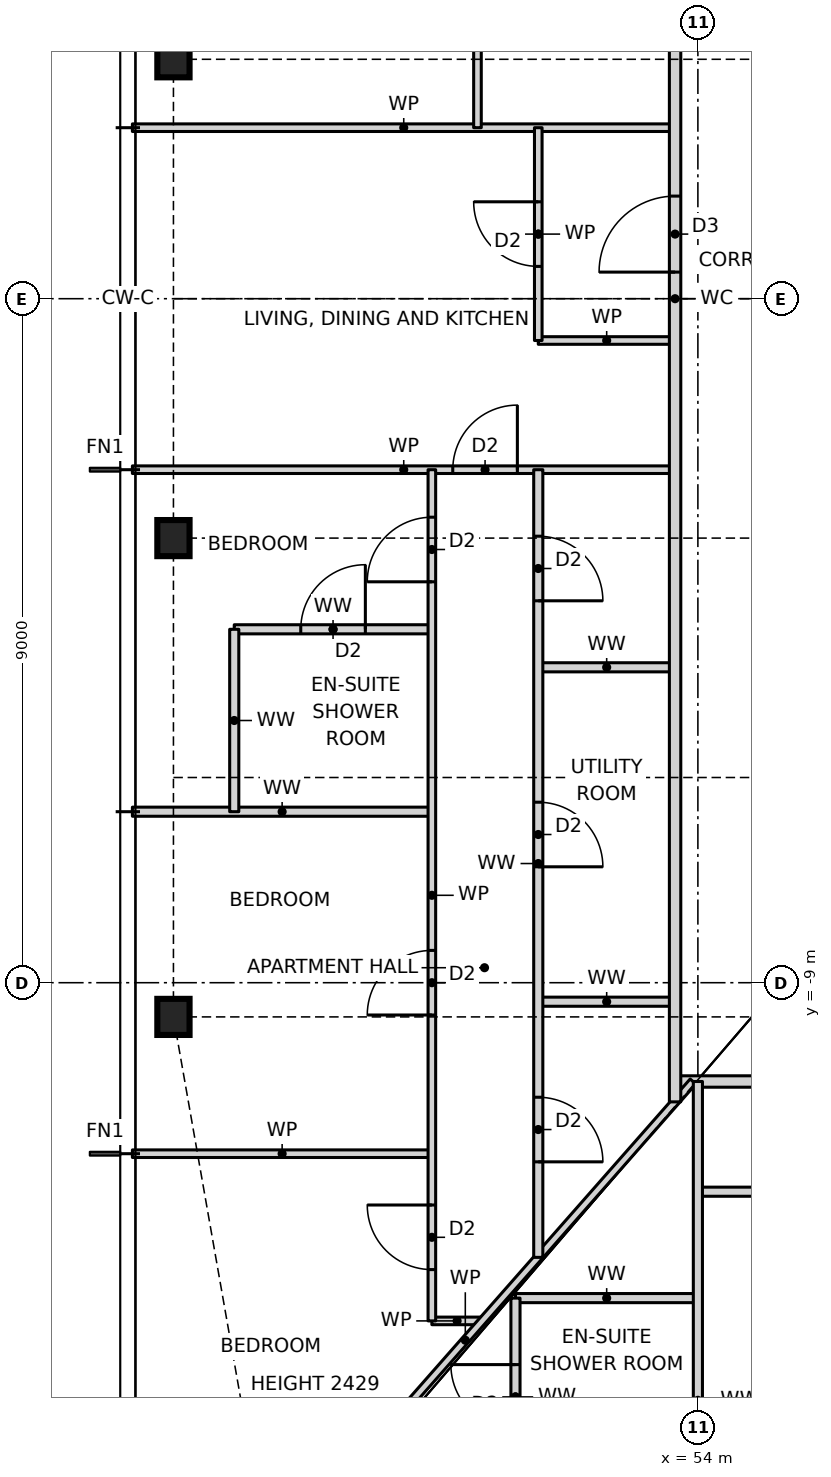
"""IFC4 building model, lengths in metres.
Left out: names, types, materials, properties, quantities, classifications, styles, units other than length and angle.
Written with IfcOpenShell. Run it as: python <this file> out.ifc"""

import sys

from ifc_helpers import new_model, si_unit, direction, frame, frame_2d, origin, origin_2d, place, context, subcontext, project, spatial, rectangle, i_section, extrude, element, fill, save


model = new_model("IFC4")
c1 = context("Model", 3, precision=1e-05, world=origin(), true_north=direction((0.0, 1.0)))
c2 = subcontext(c1, "Body", "Model", "MODEL_VIEW")
j1 = project(units=[si_unit("LENGTHUNIT", "METRE"), si_unit("PLANEANGLEUNIT", "RADIAN")], contexts=[c1])
p1 = place(None, origin())
s1 = spatial("IfcSite", under=j1, at=p1, CompositionType="ELEMENT")
p2 = place(p1, origin())
s2 = spatial("IfcBuilding", under=s1, at=p2, CompositionType="ELEMENT")
p3 = place(p2, frame((0.0, 0.0, 53.5)))
s3 = spatial("IfcBuildingStorey", under=s2, at=p3, CompositionType="ELEMENT", Elevation=53.5)
for number, where, z_axis, x_axis in (
    (1, (47.1, 3.15, 0.0), (0.0, 0.0, 1.0), (1.0, 0.0, 0.0)),
    (2, (47.1, -3.15, 0.0), (0.0, 0.0, 1.0), (1.0, 0.0, 0.0)),
    (3, (47.1, -9.45, 0.0), (0.0, 0.0, 1.0), (1.0, 0.0, 0.0)),
):
    element("IfcColumn", number, at=place(p3, frame(where, z_axis=z_axis, x_axis=x_axis)), inside=s3, PredefinedType="COLUMN", context=c2, shape_type="SweptSolid", body=[
        extrude(i_section(OverallWidth=0.424, OverallDepth=0.475, WebThickness=0.048, FlangeThickness=0.077, at=origin_2d()), origin(), (0.0, 0.0, 1.0), 3.5),
    ])
p4 = place(p3, frame((50.5, -13.45, 0.0), z_axis=(0.0, 0.0, 1.0), x_axis=(1.0, 0.0, 0.0)))
e4 = element("IfcWall", 4, at=p4, inside=s3, PredefinedType="PARTITIONING", context=c2, shape_type="SweptSolid", body=[
    extrude(rectangle(XDim=0.664, YDim=0.1, at=frame_2d((0.332, 0.0))), origin(), (0.0, 0.0, 1.0), 3.27),
])
p5 = place(p3, frame((51.6, -13.15, 0.0), z_axis=(0.0, 0.0, 1.0), x_axis=(1.0, 0.0, 0.0)))
e5 = element("IfcWall", 5, at=p5, inside=s3, PredefinedType="PARTITIONING", context=c2, shape_type="SweptSolid", body=[
    extrude(rectangle(XDim=2.4, YDim=0.12, at=frame_2d((1.2, 0.0))), origin(), (0.0, 0.0, 1.0), 3.27),
])
p6 = place(p3, frame((54.0, -11.75, 0.0), z_axis=(0.0, 0.0, 1.0), x_axis=(1.0, 0.0, 0.0)))
e6 = element("IfcWall", 6, at=p6, inside=s3, PredefinedType="PARTITIONING", context=c2, shape_type="SweptSolid", body=[
    extrude(rectangle(XDim=19.34, YDim=0.12, at=frame_2d((9.67, 0.0))), origin(), (0.0, 0.0, 1.0), 3.27),
])
p7 = place(p6, frame((1.375, 0.0, 0.0)))
e7 = element("IfcOpeningElement", 7, at=p7, cuts=e6, PredefinedType="OPENING", context=c2, shape_type="SweptSolid", body=[
    extrude(rectangle(XDim=0.85, YDim=2.1, at=frame_2d((0.425, 1.05))), frame((0.0, 0.07, 0.0), z_axis=(0.0, -1.0, 0.0), x_axis=(1.0, 0.0, 0.0)), (0.0, 0.0, 1.0), 0.14),
])
p8 = place(p6, frame((4.575, 0.0, 0.0)))
e8 = element("IfcOpeningElement", 8, at=p8, cuts=e6, PredefinedType="OPENING", context=c2, shape_type="SweptSolid", body=[
    extrude(rectangle(XDim=0.85, YDim=2.1, at=frame_2d((0.425, 1.05))), frame((0.0, 0.07, 0.0), z_axis=(0.0, -1.0, 0.0), x_axis=(1.0, 0.0, 0.0)), (0.0, 0.0, 1.0), 0.14),
])
p9 = place(p6, frame((11.325, 0.0, 0.0)))
e9 = element("IfcOpeningElement", 9, at=p9, cuts=e6, PredefinedType="OPENING", context=c2, shape_type="SweptSolid", body=[
    extrude(rectangle(XDim=0.85, YDim=2.1, at=frame_2d((0.425, 1.05))), frame((0.0, 0.07, 0.0), z_axis=(0.0, -1.0, 0.0), x_axis=(1.0, 0.0, 0.0)), (0.0, 0.0, 1.0), 0.14),
])
p10 = place(p6, frame((16.495, 0.0, 0.0)))
e10 = element("IfcOpeningElement", 10, at=p10, cuts=e6, PredefinedType="OPENING", context=c2, shape_type="SweptSolid", body=[
    extrude(rectangle(XDim=0.85, YDim=2.1, at=frame_2d((0.425, 1.05))), frame((0.0, 0.07, 0.0), z_axis=(0.0, -1.0, 0.0), x_axis=(1.0, 0.0, 0.0)), (0.0, 0.0, 1.0), 0.14),
])
p11 = place(p3, frame((46.56, -11.25, 0.0), z_axis=(0.0, 0.0, 1.0), x_axis=(1.0, 0.0, 0.0)))
e11 = element("IfcWall", 11, at=p11, inside=s3, PredefinedType="PARTITIONING", context=c2, shape_type="SweptSolid", body=[
    extrude(rectangle(XDim=3.94, YDim=0.1, at=frame_2d((1.97, 0.0))), origin(), (0.0, 0.0, 1.0), 3.27),
])
p12 = place(p3, frame((53.7, -10.3, 0.0), z_axis=(0.0, 0.0, 1.0), x_axis=(1.0, 0.0, 0.0)))
e12 = element("IfcWall", 12, at=p12, inside=s3, PredefinedType="PARTITIONING", context=c2, shape_type="SweptSolid", body=[
    extrude(rectangle(XDim=18.6, YDim=0.15, at=frame_2d((9.3, 0.0))), origin(), (0.0, 0.0, 1.0), 3.27),
])
p13 = place(p12, frame((4.8, 0.0, 0.0)))
e13 = element("IfcOpeningElement", 13, at=p13, cuts=e12, PredefinedType="OPENING", context=c2, shape_type="SweptSolid", body=[
    extrude(rectangle(XDim=1.0, YDim=2.1, at=frame_2d((0.5, 1.05))), frame((0.0, 0.085, 0.0), z_axis=(0.0, -1.0, 0.0), x_axis=(1.0, 0.0, 0.0)), (0.0, 0.0, 1.0), 0.17),
])
p14 = place(p3, frame((51.9, -9.25, 0.0), z_axis=(0.0, 0.0, 1.0), x_axis=(1.0, 0.0, 0.0)))
e14 = element("IfcWall", 14, at=p14, inside=s3, PredefinedType="PARTITIONING", context=c2, shape_type="SweptSolid", body=[
    extrude(rectangle(XDim=1.8, YDim=0.12, at=frame_2d((0.9, 0.0))), origin(), (0.0, 0.0, 1.0), 3.27),
])
p15 = place(p3, frame((46.56, -6.75, 0.0), z_axis=(0.0, 0.0, 1.0), x_axis=(1.0, 0.0, 0.0)))
e15 = element("IfcWall", 15, at=p15, inside=s3, PredefinedType="PARTITIONING", context=c2, shape_type="SweptSolid", body=[
    extrude(rectangle(XDim=3.94, YDim=0.12, at=frame_2d((1.97, 0.0))), origin(), (0.0, 0.0, 1.0), 3.27),
])
p16 = place(p3, frame((51.9, -4.85, 0.0), z_axis=(0.0, 0.0, 1.0), x_axis=(1.0, 0.0, 0.0)))
e16 = element("IfcWall", 16, at=p16, inside=s3, PredefinedType="PARTITIONING", context=c2, shape_type="SweptSolid", body=[
    extrude(rectangle(XDim=1.8, YDim=0.12, at=frame_2d((0.9, 0.0))), origin(), (0.0, 0.0, 1.0), 3.27),
])
p17 = place(p3, frame((47.9, -4.35, 0.0), z_axis=(0.0, 0.0, 1.0), x_axis=(1.0, 0.0, 0.0)))
e17 = element("IfcWall", 17, at=p17, inside=s3, PredefinedType="PARTITIONING", context=c2, shape_type="SweptSolid", body=[
    extrude(rectangle(XDim=2.6, YDim=0.12, at=frame_2d((1.3, 0.0))), origin(), (0.0, 0.0, 1.0), 3.27),
])
p18 = place(p17, frame((0.875, 0.0, 0.0)))
e18 = element("IfcOpeningElement", 18, at=p18, cuts=e17, PredefinedType="OPENING", context=c2, shape_type="SweptSolid", body=[
    extrude(rectangle(XDim=0.85, YDim=2.1, at=frame_2d((0.425, 1.05))), frame((0.0, 0.07, 0.0), z_axis=(0.0, -1.0, 0.0), x_axis=(1.0, 0.0, 0.0)), (0.0, 0.0, 1.0), 0.14),
])
p19 = place(p3, frame((46.56, -2.25, 0.0), z_axis=(0.0, 0.0, 1.0), x_axis=(1.0, 0.0, 0.0)))
e19 = element("IfcWall", 19, at=p19, inside=s3, PredefinedType="PARTITIONING", context=c2, shape_type="SweptSolid", body=[
    extrude(rectangle(XDim=7.14, YDim=0.1, at=frame_2d((3.57, 0.0))), origin(), (0.0, 0.0, 1.0), 3.27),
])
p20 = place(p19, frame((4.215, 0.0, 0.0)))
e20 = element("IfcOpeningElement", 20, at=p20, cuts=e19, PredefinedType="OPENING", context=c2, shape_type="SweptSolid", body=[
    extrude(rectangle(XDim=0.85, YDim=2.1, at=frame_2d((0.425, 1.05))), frame((0.0, 0.06, 0.0), z_axis=(0.0, -1.0, 0.0), x_axis=(1.0, 0.0, 0.0)), (0.0, 0.0, 1.0), 0.12),
])
p21 = place(p3, frame((51.9, -0.55, 0.0), z_axis=(0.0, 0.0, 1.0), x_axis=(1.0, 0.0, 0.0)))
e21 = element("IfcWall", 21, at=p21, inside=s3, PredefinedType="PARTITIONING", context=c2, shape_type="SweptSolid", body=[
    extrude(rectangle(XDim=1.8, YDim=0.1, at=frame_2d((0.9, 0.0))), origin(), (0.0, 0.0, 1.0), 3.27),
])
p22 = place(p3, frame((46.56, 2.25, 0.0), z_axis=(0.0, 0.0, 1.0), x_axis=(1.0, 0.0, 0.0)))
e22 = element("IfcWall", 22, at=p22, inside=s3, PredefinedType="PARTITIONING", context=c2, shape_type="SweptSolid", body=[
    extrude(rectangle(XDim=7.14, YDim=0.1, at=frame_2d((3.57, 0.0))), origin(), (0.0, 0.0, 1.0), 3.27),
])
p23 = place(p3, frame((47.944, -17.109, 0.0), z_axis=(0.0, 0.0, 1.0), x_axis=(0.660638210404, 0.750704439146, 0.0)))
e23 = element("IfcWall", 23, at=p23, inside=s3, PredefinedType="PARTITIONING", context=c2, shape_type="SweptSolid", body=[
    extrude(rectangle(XDim=9.07, YDim=0.1, at=frame_2d((4.535, 0.0))), origin(), (0.0, 0.0, 1.0), 2.429),
])
p24 = place(p3, frame((54.0, -18.69, 0.0), z_axis=(0.0, 0.0, 1.0), x_axis=(0.0, 1.0, 0.0)))
e24 = element("IfcWall", 24, at=p24, inside=s3, PredefinedType="PARTITIONING", context=c2, shape_type="SweptSolid", body=[
    extrude(rectangle(XDim=8.39, YDim=0.12, at=frame_2d((4.195, 0.0))), origin(), (0.0, 0.0, 1.0), 3.27),
])
p25 = place(p24, frame((1.045, 0.0, 0.0)))
e25 = element("IfcOpeningElement", 25, at=p25, cuts=e24, PredefinedType="OPENING", context=c2, shape_type="SweptSolid", body=[
    extrude(rectangle(XDim=0.85, YDim=2.1, at=frame_2d((0.425, 1.05))), frame((0.0, 0.07, 0.0), z_axis=(0.0, -1.0, 0.0), x_axis=(1.0, 0.0, 0.0)), (0.0, 0.0, 1.0), 0.14),
])
p26 = place(p3, frame((53.7, -10.568, 0.0), z_axis=(0.0, 0.0, 1.0), x_axis=(0.0, 1.0, 0.0)))
e26 = element("IfcWall", 26, at=p26, inside=s3, PredefinedType="PARTITIONING", context=c2, shape_type="SweptSolid", body=[
    extrude(rectangle(XDim=21.136, YDim=0.15, at=frame_2d((10.568, 0.0))), origin(), (0.0, 0.0, 1.0), 3.27),
])
p27 = place(p26, frame((16.318, 0.0, 0.0)))
e27 = element("IfcOpeningElement", 27, at=p27, cuts=e26, PredefinedType="OPENING", context=c2, shape_type="SweptSolid", body=[
    extrude(rectangle(XDim=1.0, YDim=2.1, at=frame_2d((0.5, 1.05))), frame((0.0, 0.085, 0.0), z_axis=(0.0, -1.0, 0.0), x_axis=(1.0, 0.0, 0.0)), (0.0, 0.0, 1.0), 0.17),
])
p28 = place(p26, frame((10.918, 0.0, 0.0)))
e28 = element("IfcOpeningElement", 28, at=p28, cuts=e26, PredefinedType="OPENING", context=c2, shape_type="SweptSolid", body=[
    extrude(rectangle(XDim=1.0, YDim=2.1, at=frame_2d((0.5, 1.05))), frame((0.0, 0.085, 0.0), z_axis=(0.0, -1.0, 0.0), x_axis=(1.0, 0.0, 0.0)), (0.0, 0.0, 1.0), 0.17),
])
p29 = place(p3, frame((51.9, -12.614, 0.0), z_axis=(0.0, 0.0, 1.0), x_axis=(0.0, 1.0, 0.0)))
e29 = element("IfcWall", 29, at=p29, inside=s3, PredefinedType="PARTITIONING", context=c2, shape_type="SweptSolid", body=[
    extrude(rectangle(XDim=10.364, YDim=0.12, at=frame_2d((5.182, 0.0))), origin(), (0.0, 0.0, 1.0), 3.27),
])
p30 = place(p29, frame((8.639, 0.0, 0.0)))
e30 = element("IfcOpeningElement", 30, at=p30, cuts=e29, PredefinedType="OPENING", context=c2, shape_type="SweptSolid", body=[
    extrude(rectangle(XDim=0.85, YDim=2.1, at=frame_2d((0.425, 1.05))), frame((0.0, 0.07, 0.0), z_axis=(0.0, -1.0, 0.0), x_axis=(1.0, 0.0, 0.0)), (0.0, 0.0, 1.0), 0.14),
])
p31 = place(p29, frame((5.139, 0.0, 0.0)))
e31 = element("IfcOpeningElement", 31, at=p31, cuts=e29, PredefinedType="OPENING", context=c2, shape_type="SweptSolid", body=[
    extrude(rectangle(XDim=0.85, YDim=2.1, at=frame_2d((0.425, 1.05))), frame((0.0, 0.07, 0.0), z_axis=(0.0, -1.0, 0.0), x_axis=(1.0, 0.0, 0.0)), (0.0, 0.0, 1.0), 0.14),
])
p32 = place(p29, frame((1.257, 0.0, 0.0)))
e32 = element("IfcOpeningElement", 32, at=p32, cuts=e29, PredefinedType="OPENING", context=c2, shape_type="SweptSolid", body=[
    extrude(rectangle(XDim=0.85, YDim=2.1, at=frame_2d((0.425, 1.05))), frame((0.0, 0.07, 0.0), z_axis=(0.0, -1.0, 0.0), x_axis=(1.0, 0.0, 0.0)), (0.0, 0.0, 1.0), 0.14),
])
p33 = place(p3, frame((51.9, -0.55, 0.0), z_axis=(0.0, 0.0, 1.0), x_axis=(0.0, 1.0, 0.0)))
e33 = element("IfcWall", 33, at=p33, inside=s3, PredefinedType="PARTITIONING", context=c2, shape_type="SweptSolid", body=[
    extrude(rectangle(XDim=2.8, YDim=0.1, at=frame_2d((1.4, 0.0))), origin(), (0.0, 0.0, 1.0), 3.27),
])
p34 = place(p33, frame((0.975, 0.0, 0.0)))
e34 = element("IfcOpeningElement", 34, at=p34, cuts=e33, PredefinedType="OPENING", context=c2, shape_type="SweptSolid", body=[
    extrude(rectangle(XDim=0.85, YDim=2.1, at=frame_2d((0.425, 1.05))), frame((0.0, 0.06, 0.0), z_axis=(0.0, -1.0, 0.0), x_axis=(1.0, 0.0, 0.0)), (0.0, 0.0, 1.0), 0.12),
])
p35 = place(p3, frame((51.6, -15.75, 0.0), z_axis=(0.0, 0.0, 1.0), x_axis=(0.0, 1.0, 0.0)))
e35 = element("IfcWall", 35, at=p35, inside=s3, PredefinedType="PARTITIONING", context=c2, shape_type="SweptSolid", body=[
    extrude(rectangle(XDim=2.6, YDim=0.12, at=frame_2d((1.3, 0.0))), origin(), (0.0, 0.0, 1.0), 3.27),
])
p36 = place(p35, frame((0.875, 0.0, 0.0)))
e36 = element("IfcOpeningElement", 36, at=p36, cuts=e35, PredefinedType="OPENING", context=c2, shape_type="SweptSolid", body=[
    extrude(rectangle(XDim=0.85, YDim=2.1, at=frame_2d((0.425, 1.05))), frame((0.0, 0.07, 0.0), z_axis=(0.0, -1.0, 0.0), x_axis=(1.0, 0.0, 0.0)), (0.0, 0.0, 1.0), 0.14),
])
p37 = place(p3, frame((51.1, 2.25, 0.0), z_axis=(0.0, 0.0, 1.0), x_axis=(0.0, 1.0, 0.0)))
e37 = element("IfcWall", 37, at=p37, inside=s3, PredefinedType="PARTITIONING", context=c2, shape_type="SweptSolid", body=[
    extrude(rectangle(XDim=9.0, YDim=0.1, at=frame_2d((4.5, 0.0))), origin(), (0.0, 0.0, 1.0), 3.27),
])
p38 = place(p37, frame((6.775, 0.0, 0.0)))
e38 = element("IfcOpeningElement", 38, at=p38, cuts=e37, PredefinedType="OPENING", context=c2, shape_type="SweptSolid", body=[
    extrude(rectangle(XDim=0.85, YDim=2.1, at=frame_2d((0.425, 1.05))), frame((0.0, 0.06, 0.0), z_axis=(0.0, -1.0, 0.0), x_axis=(1.0, 0.0, 0.0)), (0.0, 0.0, 1.0), 0.12),
])
p39 = place(p37, frame((3.575, 0.0, 0.0)))
e39 = element("IfcOpeningElement", 39, at=p39, cuts=e37, PredefinedType="OPENING", context=c2, shape_type="SweptSolid", body=[
    extrude(rectangle(XDim=0.85, YDim=2.1, at=frame_2d((0.425, 1.05))), frame((0.0, 0.06, 0.0), z_axis=(0.0, -1.0, 0.0), x_axis=(1.0, 0.0, 0.0)), (0.0, 0.0, 1.0), 0.12),
])
p40 = place(p3, frame((50.5, -13.45, 0.0), z_axis=(0.0, 0.0, 1.0), x_axis=(0.0, 1.0, 0.0)))
e40 = element("IfcWall", 40, at=p40, inside=s3, PredefinedType="PARTITIONING", context=c2, shape_type="SweptSolid", body=[
    extrude(rectangle(XDim=11.2, YDim=0.1, at=frame_2d((5.6, 0.0))), origin(), (0.0, 0.0, 1.0), 3.27),
])
p41 = place(p40, frame((9.725, 0.0, 0.0)))
e41 = element("IfcOpeningElement", 41, at=p41, cuts=e40, PredefinedType="OPENING", context=c2, shape_type="SweptSolid", body=[
    extrude(rectangle(XDim=0.85, YDim=2.1, at=frame_2d((0.425, 1.05))), frame((0.0, 0.06, 0.0), z_axis=(0.0, -1.0, 0.0), x_axis=(1.0, 0.0, 0.0)), (0.0, 0.0, 1.0), 0.12),
])
p42 = place(p40, frame((4.025, 0.0, 0.0)))
e42 = element("IfcOpeningElement", 42, at=p42, cuts=e40, PredefinedType="OPENING", context=c2, shape_type="SweptSolid", body=[
    extrude(rectangle(XDim=0.85, YDim=2.1, at=frame_2d((0.425, 1.05))), frame((0.0, 0.06, 0.0), z_axis=(0.0, -1.0, 0.0), x_axis=(1.0, 0.0, 0.0)), (0.0, 0.0, 1.0), 0.12),
])
p43 = place(p40, frame((0.675, 0.0, 0.0)))
e43 = element("IfcOpeningElement", 43, at=p43, cuts=e40, PredefinedType="OPENING", context=c2, shape_type="SweptSolid", body=[
    extrude(rectangle(XDim=0.85, YDim=2.1, at=frame_2d((0.425, 1.05))), frame((0.0, 0.06, 0.0), z_axis=(0.0, -1.0, 0.0), x_axis=(1.0, 0.0, 0.0)), (0.0, 0.0, 1.0), 0.12),
])
p44 = place(p3, frame((47.9, -6.75, 0.0), z_axis=(0.0, 0.0, 1.0), x_axis=(0.0, 1.0, 0.0)))
e44 = element("IfcWall", 44, at=p44, inside=s3, PredefinedType="PARTITIONING", context=c2, shape_type="SweptSolid", body=[
    extrude(rectangle(XDim=2.4, YDim=0.12, at=frame_2d((1.2, 0.0))), origin(), (0.0, 0.0, 1.0), 3.27),
])
p45 = place(p36, origin())
e45 = element("IfcDoor", 45, at=p45, inside=s3, OperationType="SINGLE_SWING_RIGHT", PredefinedType="DOOR", context=c2, shape_type="SweptSolid", body=[
    extrude(rectangle(XDim=0.85, YDim=2.1, at=frame_2d((0.425, 1.05))), frame((0.0, 0.025, 0.0), z_axis=(0.0, -1.0, 0.0), x_axis=(1.0, 0.0, 0.0)), (0.0, 0.0, 1.0), 0.05),
])
fill(e36, e45)
p46 = place(p28, origin())
e46 = element("IfcDoor", 46, at=p46, inside=s3, OperationType="SINGLE_SWING_LEFT", PredefinedType="DOOR", context=c2, shape_type="SweptSolid", body=[
    extrude(rectangle(XDim=1.0, YDim=2.1, at=frame_2d((0.5, 1.05))), frame((0.0, 0.025, 0.0), z_axis=(0.0, -1.0, 0.0), x_axis=(1.0, 0.0, 0.0)), (0.0, 0.0, 1.0), 0.05),
])
fill(e28, e46)
p47 = place(p34, origin())
e47 = element("IfcDoor", 47, at=p47, inside=s3, OperationType="SINGLE_SWING_RIGHT", PredefinedType="DOOR", context=c2, shape_type="SweptSolid", body=[
    extrude(rectangle(XDim=0.85, YDim=2.1, at=frame_2d((0.425, 1.05))), frame((0.0, 0.025, 0.0), z_axis=(0.0, -1.0, 0.0), x_axis=(1.0, 0.0, 0.0)), (0.0, 0.0, 1.0), 0.05),
])
fill(e34, e47)
p48 = place(p20, origin())
e48 = element("IfcDoor", 48, at=p48, inside=s3, OperationType="SINGLE_SWING_RIGHT", PredefinedType="DOOR", context=c2, shape_type="SweptSolid", body=[
    extrude(rectangle(XDim=0.85, YDim=2.1, at=frame_2d((0.425, 1.05))), frame((0.0, 0.025, 0.0), z_axis=(0.0, -1.0, 0.0), x_axis=(1.0, 0.0, 0.0)), (0.0, 0.0, 1.0), 0.05),
])
fill(e20, e48)
p49 = place(p18, origin())
e49 = element("IfcDoor", 49, at=p49, inside=s3, OperationType="SINGLE_SWING_RIGHT", PredefinedType="DOOR", context=c2, shape_type="SweptSolid", body=[
    extrude(rectangle(XDim=0.85, YDim=2.1, at=frame_2d((0.425, 1.05))), frame((0.0, 0.025, 0.0), z_axis=(0.0, -1.0, 0.0), x_axis=(1.0, 0.0, 0.0)), (0.0, 0.0, 1.0), 0.05),
])
fill(e18, e49)
p50 = place(p41, origin())
e50 = element("IfcDoor", 50, at=p50, inside=s3, OperationType="SINGLE_SWING_LEFT", PredefinedType="DOOR", context=c2, shape_type="SweptSolid", body=[
    extrude(rectangle(XDim=0.85, YDim=2.1, at=frame_2d((0.425, 1.05))), frame((0.0, 0.025, 0.0), z_axis=(0.0, -1.0, 0.0), x_axis=(1.0, 0.0, 0.0)), (0.0, 0.0, 1.0), 0.05),
])
fill(e41, e50)
p51 = place(p42, origin())
e51 = element("IfcDoor", 51, at=p51, inside=s3, OperationType="SINGLE_SWING_LEFT", PredefinedType="DOOR", context=c2, shape_type="SweptSolid", body=[
    extrude(rectangle(XDim=0.85, YDim=2.1, at=frame_2d((0.425, 1.05))), frame((0.0, 0.025, 0.0), z_axis=(0.0, -1.0, 0.0), x_axis=(1.0, 0.0, 0.0)), (0.0, 0.0, 1.0), 0.05),
])
fill(e42, e51)
p52 = place(p43, origin())
e52 = element("IfcDoor", 52, at=p52, inside=s3, OperationType="SINGLE_SWING_RIGHT", PredefinedType="DOOR", context=c2, shape_type="SweptSolid", body=[
    extrude(rectangle(XDim=0.85, YDim=2.1, at=frame_2d((0.425, 1.05))), frame((0.0, 0.025, 0.0), z_axis=(0.0, -1.0, 0.0), x_axis=(1.0, 0.0, 0.0)), (0.0, 0.0, 1.0), 0.05),
])
fill(e43, e52)
p53 = place(p30, frame((0.85, 0.0, 0.0), z_axis=(0.0, 0.0, 1.0), x_axis=(-1.0, 0.0, 0.0)))
e53 = element("IfcDoor", 53, at=p53, inside=s3, OperationType="SINGLE_SWING_RIGHT", PredefinedType="DOOR", context=c2, shape_type="SweptSolid", body=[
    extrude(rectangle(XDim=0.85, YDim=2.1, at=frame_2d((0.425, 1.05))), frame((0.0, 0.025, 0.0), z_axis=(0.0, -1.0, 0.0), x_axis=(1.0, 0.0, 0.0)), (0.0, 0.0, 1.0), 0.05),
])
fill(e30, e53)
p54 = place(p31, frame((0.85, 0.0, 0.0), z_axis=(0.0, 0.0, 1.0), x_axis=(-1.0, 0.0, 0.0)))
e54 = element("IfcDoor", 54, at=p54, inside=s3, OperationType="SINGLE_SWING_RIGHT", PredefinedType="DOOR", context=c2, shape_type="SweptSolid", body=[
    extrude(rectangle(XDim=0.85, YDim=2.1, at=frame_2d((0.425, 1.05))), frame((0.0, 0.025, 0.0), z_axis=(0.0, -1.0, 0.0), x_axis=(1.0, 0.0, 0.0)), (0.0, 0.0, 1.0), 0.05),
])
fill(e31, e54)
p55 = place(p32, frame((0.85, 0.0, 0.0), z_axis=(0.0, 0.0, 1.0), x_axis=(-1.0, 0.0, 0.0)))
e55 = element("IfcDoor", 55, at=p55, inside=s3, OperationType="SINGLE_SWING_RIGHT", PredefinedType="DOOR", context=c2, shape_type="SweptSolid", body=[
    extrude(rectangle(XDim=0.85, YDim=2.1, at=frame_2d((0.425, 1.05))), frame((0.0, 0.025, 0.0), z_axis=(0.0, -1.0, 0.0), x_axis=(1.0, 0.0, 0.0)), (0.0, 0.0, 1.0), 0.05),
])
fill(e32, e55)
save(model, sys.argv[1])
